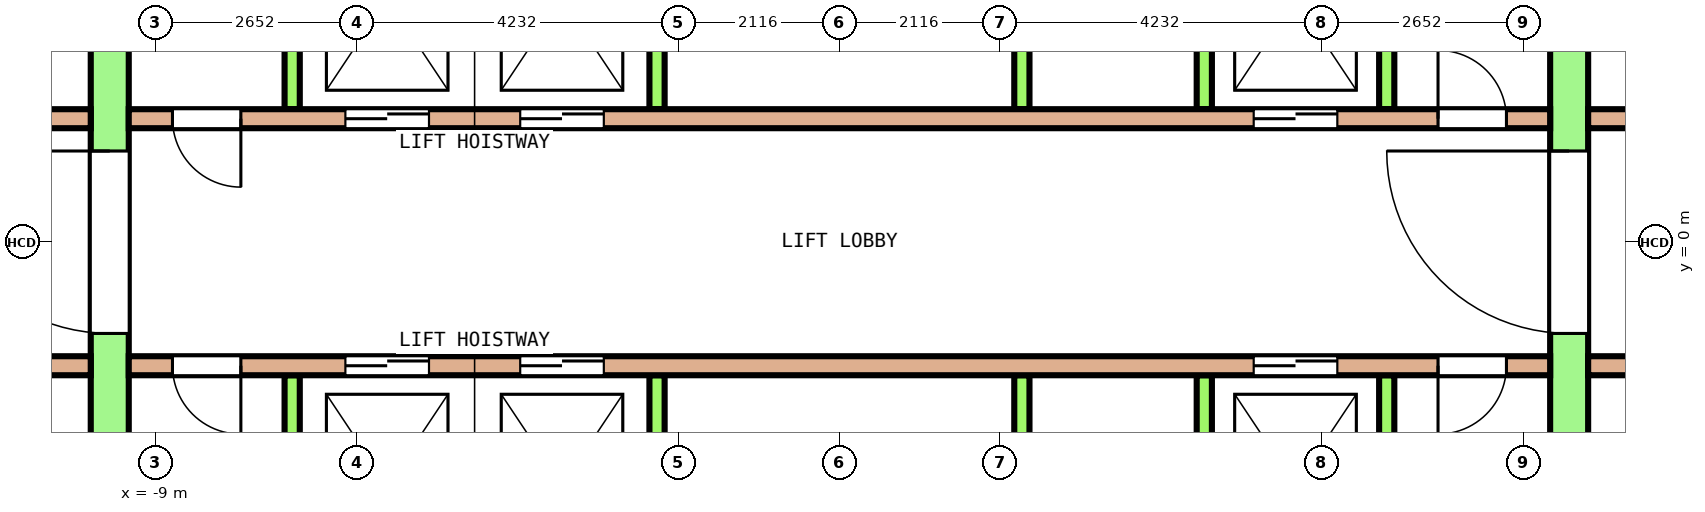
"""IFC4 building model, lengths in metres.
Left out: names, types, materials, properties, quantities, classifications, styles, units other than length and angle.
Written with IfcOpenShell. Run it as: python <this file> out.ifc"""

import sys

from ifc_helpers import new_model, si_unit, direction, frame, frame_2d, origin, place, context, subcontext, project, spatial, rectangle, extrude, element, fill, save


model = new_model("IFC4")
c1 = context("Model", 3, precision=1e-05, world=origin(), true_north=direction((0.0, 1.0)))
c2 = subcontext(c1, "Body", "Model", "MODEL_VIEW")
j1 = project(units=[si_unit("LENGTHUNIT", "METRE"), si_unit("PLANEANGLEUNIT", "RADIAN")], contexts=[c1])
p1 = place(None, origin())
s1 = spatial("IfcSite", under=j1, at=p1, CompositionType="ELEMENT")
p2 = place(p1, origin())
s2 = spatial("IfcBuilding", under=s1, at=p2, CompositionType="ELEMENT")
p3 = place(p2, frame((0.0, 0.0, 215.4)))
s3 = spatial("IfcBuildingStorey", under=s2, at=p3, CompositionType="ELEMENT", Elevation=215.4)
p4 = place(p3, frame((-9.6, -7.8, 0.0), z_axis=(0.0, 0.0, 1.0), x_axis=(0.0, 1.0, 0.0)))
e1 = element("IfcWall", 1, at=p4, inside=s3, PredefinedType="SHEAR", context=c2, shape_type="SweptSolid", body=[
    extrude(rectangle(XDim=15.6, YDim=0.5, at=frame_2d((7.8, 0.0))), origin(), (0.0, 0.0, 1.0), 3.7),
])
p5 = place(p4, frame((6.6, 0.0, 0.0)))
e2 = element("IfcOpeningElement", 2, at=p5, cuts=e1, PredefinedType="OPENING", context=c2, shape_type="SweptSolid", body=[
    extrude(rectangle(XDim=2.4, YDim=2.1, at=frame_2d((1.2, 1.05))), frame((0.0, 0.26, 0.0), z_axis=(0.0, -1.0, 0.0), x_axis=(1.0, 0.0, 0.0)), (0.0, 0.0, 1.0), 0.52),
])
p6 = place(p4, frame((13.5, 0.0, 0.0)))
e3 = element("IfcOpeningElement", 3, at=p6, cuts=e1, PredefinedType="OPENING", context=c2, shape_type="SweptSolid", body=[
    extrude(rectangle(XDim=1.2, YDim=2.1, at=frame_2d((0.6, 1.05))), frame((0.0, 0.26, 0.0), z_axis=(0.0, -1.0, 0.0), x_axis=(1.0, 0.0, 0.0)), (0.0, 0.0, 1.0), 0.52),
])
p7 = place(p4, frame((0.9, 0.0, 0.0)))
e4 = element("IfcOpeningElement", 4, at=p7, cuts=e1, PredefinedType="OPENING", context=c2, shape_type="SweptSolid", body=[
    extrude(rectangle(XDim=1.2, YDim=2.1, at=frame_2d((0.6, 1.05))), frame((0.0, 0.26, 0.0), z_axis=(0.0, -1.0, 0.0), x_axis=(1.0, 0.0, 0.0)), (0.0, 0.0, 1.0), 0.52),
])
p8 = place(p3, frame((9.6, -7.8, 0.0), z_axis=(0.0, 0.0, 1.0), x_axis=(0.0, 1.0, 0.0)))
e5 = element("IfcWall", 5, at=p8, inside=s3, PredefinedType="SHEAR", context=c2, shape_type="SweptSolid", body=[
    extrude(rectangle(XDim=15.6, YDim=0.5, at=frame_2d((7.8, 0.0))), origin(), (0.0, 0.0, 1.0), 3.7),
])
p9 = place(p8, frame((6.6, 0.0, 0.0)))
e6 = element("IfcOpeningElement", 6, at=p9, cuts=e5, PredefinedType="OPENING", context=c2, shape_type="SweptSolid", body=[
    extrude(rectangle(XDim=2.4, YDim=2.1, at=frame_2d((1.2, 1.05))), frame((0.0, 0.26, 0.0), z_axis=(0.0, -1.0, 0.0), x_axis=(1.0, 0.0, 0.0)), (0.0, 0.0, 1.0), 0.52),
])
p10 = place(p8, frame((13.5, 0.0, 0.0)))
e7 = element("IfcOpeningElement", 7, at=p10, cuts=e5, PredefinedType="OPENING", context=c2, shape_type="SweptSolid", body=[
    extrude(rectangle(XDim=1.2, YDim=2.1, at=frame_2d((0.6, 1.05))), frame((0.0, 0.26, 0.0), z_axis=(0.0, -1.0, 0.0), x_axis=(1.0, 0.0, 0.0)), (0.0, 0.0, 1.0), 0.52),
])
p11 = place(p8, frame((1.0, 0.0, 0.0)))
e8 = element("IfcOpeningElement", 8, at=p11, cuts=e5, PredefinedType="OPENING", context=c2, shape_type="SweptSolid", body=[
    extrude(rectangle(XDim=1.0, YDim=2.1, at=frame_2d((0.5, 1.05))), frame((0.0, 0.26, 0.0), z_axis=(0.0, -1.0, 0.0), x_axis=(1.0, 0.0, 0.0)), (0.0, 0.0, 1.0), 0.52),
])
p12 = place(p3, frame((-12.9, 1.625, 0.0), z_axis=(0.0, 0.0, 1.0), x_axis=(1.0, 0.0, 0.0)))
e9 = element("IfcWall", 9, at=p12, inside=s3, PredefinedType="SOLIDWALL", context=c2, shape_type="SweptSolid", body=[
    extrude(rectangle(XDim=3.05, YDim=0.25, at=frame_2d((1.525, 0.0))), origin(), (0.0, 0.0, 1.0), 3.7),
])
p13 = place(p12, frame((1.075, 0.0, 0.0)))
e10 = element("IfcOpeningElement", 10, at=p13, cuts=e9, PredefinedType="OPENING", context=c2, shape_type="SweptSolid", body=[
    extrude(rectangle(XDim=0.9, YDim=2.1, at=frame_2d((0.45, 1.05))), frame((0.0, 0.135, 0.0), z_axis=(0.0, -1.0, 0.0), x_axis=(1.0, 0.0, 0.0)), (0.0, 0.0, 1.0), 0.27),
])
p14 = place(p3, frame((-9.35, 1.625, 0.0), z_axis=(0.0, 0.0, 1.0), x_axis=(1.0, 0.0, 0.0)))
e11 = element("IfcWall", 11, at=p14, inside=s3, PredefinedType="SOLIDWALL", context=c2, shape_type="SweptSolid", body=[
    extrude(rectangle(XDim=18.7, YDim=0.25, at=frame_2d((9.35, 0.0))), origin(), (0.0, 0.0, 1.0), 3.7),
])
p15 = place(p14, frame((2.85, 0.0, 0.0)))
e12 = element("IfcOpeningElement", 12, at=p15, cuts=e11, PredefinedType="OPENING", context=c2, shape_type="SweptSolid", body=[
    extrude(rectangle(XDim=1.1, YDim=2.1, at=frame_2d((0.55, 1.05))), frame((0.0, 0.135, 0.0), z_axis=(0.0, -1.0, 0.0), x_axis=(1.0, 0.0, 0.0)), (0.0, 0.0, 1.0), 0.27),
])
p16 = place(p14, frame((5.15, 0.0, 0.0)))
e13 = element("IfcOpeningElement", 13, at=p16, cuts=e11, PredefinedType="OPENING", context=c2, shape_type="SweptSolid", body=[
    extrude(rectangle(XDim=1.1, YDim=2.1, at=frame_2d((0.55, 1.05))), frame((0.0, 0.135, 0.0), z_axis=(0.0, -1.0, 0.0), x_axis=(1.0, 0.0, 0.0)), (0.0, 0.0, 1.0), 0.27),
])
p17 = place(p14, frame((14.8, 0.0, 0.0)))
e14 = element("IfcOpeningElement", 14, at=p17, cuts=e11, PredefinedType="OPENING", context=c2, shape_type="SweptSolid", body=[
    extrude(rectangle(XDim=1.1, YDim=2.1, at=frame_2d((0.55, 1.05))), frame((0.0, 0.135, 0.0), z_axis=(0.0, -1.0, 0.0), x_axis=(1.0, 0.0, 0.0)), (0.0, 0.0, 1.0), 0.27),
])
p18 = place(p14, frame((0.575, 0.0, 0.0)))
e15 = element("IfcOpeningElement", 15, at=p18, cuts=e11, PredefinedType="OPENING", context=c2, shape_type="SweptSolid", body=[
    extrude(rectangle(XDim=0.9, YDim=2.1, at=frame_2d((0.45, 1.05))), frame((0.0, 0.135, 0.0), z_axis=(0.0, -1.0, 0.0), x_axis=(1.0, 0.0, 0.0)), (0.0, 0.0, 1.0), 0.27),
])
p19 = place(p14, frame((17.225, 0.0, 0.0)))
e16 = element("IfcOpeningElement", 16, at=p19, cuts=e11, PredefinedType="OPENING", context=c2, shape_type="SweptSolid", body=[
    extrude(rectangle(XDim=0.9, YDim=2.1, at=frame_2d((0.45, 1.05))), frame((0.0, 0.135, 0.0), z_axis=(0.0, -1.0, 0.0), x_axis=(1.0, 0.0, 0.0)), (0.0, 0.0, 1.0), 0.27),
])
p20 = place(p3, frame((9.85, 1.625, 0.0), z_axis=(0.0, 0.0, 1.0), x_axis=(1.0, 0.0, 0.0)))
e17 = element("IfcWall", 17, at=p20, inside=s3, PredefinedType="SOLIDWALL", context=c2, shape_type="SweptSolid", body=[
    extrude(rectangle(XDim=3.05, YDim=0.25, at=frame_2d((1.525, 0.0))), origin(), (0.0, 0.0, 1.0), 3.7),
])
p21 = place(p20, frame((1.075, 0.0, 0.0)))
e18 = element("IfcOpeningElement", 18, at=p21, cuts=e17, PredefinedType="OPENING", context=c2, shape_type="SweptSolid", body=[
    extrude(rectangle(XDim=0.9, YDim=2.1, at=frame_2d((0.45, 1.05))), frame((0.0, 0.135, 0.0), z_axis=(0.0, -1.0, 0.0), x_axis=(1.0, 0.0, 0.0)), (0.0, 0.0, 1.0), 0.27),
])
for number, where, z_axis, x_axis in (
    (19, (-7.2, 1.75, 0.0), (0.0, 0.0, 1.0), (0.0, 1.0, 0.0)),
    (20, (-2.4, 1.75, 0.0), (0.0, 0.0, 1.0), (0.0, 1.0, 0.0)),
    (21, (2.4, 1.75, 0.0), (0.0, 0.0, 1.0), (0.0, 1.0, 0.0)),
    (22, (4.8, 1.75, 0.0), (0.0, 0.0, 1.0), (0.0, 1.0, 0.0)),
    (23, (7.2, 1.75, 0.0), (0.0, 0.0, 1.0), (0.0, 1.0, 0.0)),
):
    element("IfcWall", number, at=place(p3, frame(where, z_axis=z_axis, x_axis=x_axis)), inside=s3, PredefinedType="SOLIDWALL", context=c2, shape_type="SweptSolid", body=[
        extrude(rectangle(XDim=2.9, YDim=0.2, at=frame_2d((1.45, 0.0))), origin(), (0.0, 0.0, 1.0), 3.7),
    ])
p22 = place(p3, frame((-12.9, -1.625, 0.0), z_axis=(0.0, 0.0, 1.0), x_axis=(1.0, 0.0, 0.0)))
e24 = element("IfcWall", 24, at=p22, inside=s3, PredefinedType="SOLIDWALL", context=c2, shape_type="SweptSolid", body=[
    extrude(rectangle(XDim=3.05, YDim=0.25, at=frame_2d((1.525, 0.0))), origin(), (0.0, 0.0, 1.0), 3.7),
])
p23 = place(p22, frame((1.075, 0.0, 0.0)))
e25 = element("IfcOpeningElement", 25, at=p23, cuts=e24, PredefinedType="OPENING", context=c2, shape_type="SweptSolid", body=[
    extrude(rectangle(XDim=0.9, YDim=2.1, at=frame_2d((0.45, 1.05))), frame((0.0, 0.135, 0.0), z_axis=(0.0, -1.0, 0.0), x_axis=(1.0, 0.0, 0.0)), (0.0, 0.0, 1.0), 0.27),
])
p24 = place(p3, frame((-9.35, -1.625, 0.0), z_axis=(0.0, 0.0, 1.0), x_axis=(1.0, 0.0, 0.0)))
e26 = element("IfcWall", 26, at=p24, inside=s3, PredefinedType="SOLIDWALL", context=c2, shape_type="SweptSolid", body=[
    extrude(rectangle(XDim=18.7, YDim=0.25, at=frame_2d((9.35, 0.0))), origin(), (0.0, 0.0, 1.0), 3.7),
])
p25 = place(p24, frame((2.85, 0.0, 0.0)))
e27 = element("IfcOpeningElement", 27, at=p25, cuts=e26, PredefinedType="OPENING", context=c2, shape_type="SweptSolid", body=[
    extrude(rectangle(XDim=1.1, YDim=2.1, at=frame_2d((0.55, 1.05))), frame((0.0, 0.135, 0.0), z_axis=(0.0, -1.0, 0.0), x_axis=(1.0, 0.0, 0.0)), (0.0, 0.0, 1.0), 0.27),
])
p26 = place(p24, frame((5.15, 0.0, 0.0)))
e28 = element("IfcOpeningElement", 28, at=p26, cuts=e26, PredefinedType="OPENING", context=c2, shape_type="SweptSolid", body=[
    extrude(rectangle(XDim=1.1, YDim=2.1, at=frame_2d((0.55, 1.05))), frame((0.0, 0.135, 0.0), z_axis=(0.0, -1.0, 0.0), x_axis=(1.0, 0.0, 0.0)), (0.0, 0.0, 1.0), 0.27),
])
p27 = place(p24, frame((14.8, 0.0, 0.0)))
e29 = element("IfcOpeningElement", 29, at=p27, cuts=e26, PredefinedType="OPENING", context=c2, shape_type="SweptSolid", body=[
    extrude(rectangle(XDim=1.1, YDim=2.1, at=frame_2d((0.55, 1.05))), frame((0.0, 0.135, 0.0), z_axis=(0.0, -1.0, 0.0), x_axis=(1.0, 0.0, 0.0)), (0.0, 0.0, 1.0), 0.27),
])
p28 = place(p24, frame((0.575, 0.0, 0.0)))
e30 = element("IfcOpeningElement", 30, at=p28, cuts=e26, PredefinedType="OPENING", context=c2, shape_type="SweptSolid", body=[
    extrude(rectangle(XDim=0.9, YDim=2.1, at=frame_2d((0.45, 1.05))), frame((0.0, 0.135, 0.0), z_axis=(0.0, -1.0, 0.0), x_axis=(1.0, 0.0, 0.0)), (0.0, 0.0, 1.0), 0.27),
])
p29 = place(p24, frame((17.225, 0.0, 0.0)))
e31 = element("IfcOpeningElement", 31, at=p29, cuts=e26, PredefinedType="OPENING", context=c2, shape_type="SweptSolid", body=[
    extrude(rectangle(XDim=0.9, YDim=2.1, at=frame_2d((0.45, 1.05))), frame((0.0, 0.135, 0.0), z_axis=(0.0, -1.0, 0.0), x_axis=(1.0, 0.0, 0.0)), (0.0, 0.0, 1.0), 0.27),
])
p30 = place(p3, frame((9.85, -1.625, 0.0), z_axis=(0.0, 0.0, 1.0), x_axis=(1.0, 0.0, 0.0)))
e32 = element("IfcWall", 32, at=p30, inside=s3, PredefinedType="SOLIDWALL", context=c2, shape_type="SweptSolid", body=[
    extrude(rectangle(XDim=3.05, YDim=0.25, at=frame_2d((1.525, 0.0))), origin(), (0.0, 0.0, 1.0), 3.7),
])
p31 = place(p30, frame((1.075, 0.0, 0.0)))
e33 = element("IfcOpeningElement", 33, at=p31, cuts=e32, PredefinedType="OPENING", context=c2, shape_type="SweptSolid", body=[
    extrude(rectangle(XDim=0.9, YDim=2.1, at=frame_2d((0.45, 1.05))), frame((0.0, 0.135, 0.0), z_axis=(0.0, -1.0, 0.0), x_axis=(1.0, 0.0, 0.0)), (0.0, 0.0, 1.0), 0.27),
])
for number, where, z_axis, x_axis in (
    (34, (-7.2, -4.65, 0.0), (0.0, 0.0, 1.0), (0.0, 1.0, 0.0)),
    (35, (-2.4, -4.65, 0.0), (0.0, 0.0, 1.0), (0.0, 1.0, 0.0)),
    (36, (2.4, -4.65, 0.0), (0.0, 0.0, 1.0), (0.0, 1.0, 0.0)),
    (37, (4.8, -4.65, 0.0), (0.0, 0.0, 1.0), (0.0, 1.0, 0.0)),
    (38, (7.2, -4.65, 0.0), (0.0, 0.0, 1.0), (0.0, 1.0, 0.0)),
):
    element("IfcWall", number, at=place(p3, frame(where, z_axis=z_axis, x_axis=x_axis)), inside=s3, PredefinedType="SOLIDWALL", context=c2, shape_type="SweptSolid", body=[
        extrude(rectangle(XDim=2.9, YDim=0.2, at=frame_2d((1.45, 0.0))), origin(), (0.0, 0.0, 1.0), 3.7),
    ])
p32 = place(p15, origin())
e39 = element("IfcDoor", 39, at=p32, inside=s3, OperationType="DOUBLE_DOOR_SLIDING", PredefinedType="DOOR", context=c2, shape_type="SweptSolid", body=[
    extrude(rectangle(XDim=1.1, YDim=2.1, at=frame_2d((0.55, 1.05))), frame((0.0, 0.075, 0.0), z_axis=(0.0, -1.0, 0.0), x_axis=(1.0, 0.0, 0.0)), (0.0, 0.0, 1.0), 0.15),
])
fill(e12, e39)
p33 = place(p16, origin())
e40 = element("IfcDoor", 40, at=p33, inside=s3, OperationType="DOUBLE_DOOR_SLIDING", PredefinedType="DOOR", context=c2, shape_type="SweptSolid", body=[
    extrude(rectangle(XDim=1.1, YDim=2.1, at=frame_2d((0.55, 1.05))), frame((0.0, 0.075, 0.0), z_axis=(0.0, -1.0, 0.0), x_axis=(1.0, 0.0, 0.0)), (0.0, 0.0, 1.0), 0.15),
])
fill(e13, e40)
p34 = place(p17, origin())
e41 = element("IfcDoor", 41, at=p34, inside=s3, OperationType="DOUBLE_DOOR_SLIDING", PredefinedType="DOOR", context=c2, shape_type="SweptSolid", body=[
    extrude(rectangle(XDim=1.1, YDim=2.1, at=frame_2d((0.55, 1.05))), frame((0.0, 0.075, 0.0), z_axis=(0.0, -1.0, 0.0), x_axis=(1.0, 0.0, 0.0)), (0.0, 0.0, 1.0), 0.15),
])
fill(e14, e41)
p35 = place(p25, origin())
e42 = element("IfcDoor", 42, at=p35, inside=s3, OperationType="DOUBLE_DOOR_SLIDING", PredefinedType="DOOR", context=c2, shape_type="SweptSolid", body=[
    extrude(rectangle(XDim=1.1, YDim=2.1, at=frame_2d((0.55, 1.05))), frame((0.0, 0.075, 0.0), z_axis=(0.0, -1.0, 0.0), x_axis=(1.0, 0.0, 0.0)), (0.0, 0.0, 1.0), 0.15),
])
fill(e27, e42)
p36 = place(p26, origin())
e43 = element("IfcDoor", 43, at=p36, inside=s3, OperationType="DOUBLE_DOOR_SLIDING", PredefinedType="DOOR", context=c2, shape_type="SweptSolid", body=[
    extrude(rectangle(XDim=1.1, YDim=2.1, at=frame_2d((0.55, 1.05))), frame((0.0, 0.075, 0.0), z_axis=(0.0, -1.0, 0.0), x_axis=(1.0, 0.0, 0.0)), (0.0, 0.0, 1.0), 0.15),
])
fill(e28, e43)
p37 = place(p27, origin())
e44 = element("IfcDoor", 44, at=p37, inside=s3, OperationType="DOUBLE_DOOR_SLIDING", PredefinedType="DOOR", context=c2, shape_type="SweptSolid", body=[
    extrude(rectangle(XDim=1.1, YDim=2.1, at=frame_2d((0.55, 1.05))), frame((0.0, 0.075, 0.0), z_axis=(0.0, -1.0, 0.0), x_axis=(1.0, 0.0, 0.0)), (0.0, 0.0, 1.0), 0.15),
])
fill(e29, e44)
p38 = place(p5, origin())
e45 = element("IfcDoor", 45, at=p38, inside=s3, OperationType="DOUBLE_DOOR_SINGLE_SWING", PredefinedType="DOOR", context=c2, shape_type="SweptSolid", body=[
    extrude(rectangle(XDim=2.4, YDim=2.1, at=frame_2d((1.2, 1.05))), frame((0.0, 0.2, 0.0), z_axis=(0.0, -1.0, 0.0), x_axis=(1.0, 0.0, 0.0)), (0.0, 0.0, 1.0), 0.4),
])
fill(e2, e45)
p39 = place(p9, origin())
e46 = element("IfcDoor", 46, at=p39, inside=s3, OperationType="DOUBLE_DOOR_SINGLE_SWING", PredefinedType="DOOR", context=c2, shape_type="SweptSolid", body=[
    extrude(rectangle(XDim=2.4, YDim=2.1, at=frame_2d((1.2, 1.05))), frame((0.0, 0.2, 0.0), z_axis=(0.0, -1.0, 0.0), x_axis=(1.0, 0.0, 0.0)), (0.0, 0.0, 1.0), 0.4),
])
fill(e6, e46)
p40 = place(p18, origin())
e47 = element("IfcDoor", 47, at=p40, inside=s3, OperationType="SINGLE_SWING_LEFT", PredefinedType="DOOR", context=c2, shape_type="SweptSolid", body=[
    extrude(rectangle(XDim=0.9, YDim=2.1, at=frame_2d((0.45, 1.05))), frame((0.0, 0.075, 0.0), z_axis=(0.0, -1.0, 0.0), x_axis=(1.0, 0.0, 0.0)), (0.0, 0.0, 1.0), 0.15),
])
fill(e15, e47)
p41 = place(p19, origin())
e48 = element("IfcDoor", 48, at=p41, inside=s3, OperationType="SINGLE_SWING_RIGHT", PredefinedType="DOOR", context=c2, shape_type="SweptSolid", body=[
    extrude(rectangle(XDim=0.9, YDim=2.1, at=frame_2d((0.45, 1.05))), frame((0.0, 0.075, 0.0), z_axis=(0.0, -1.0, 0.0), x_axis=(1.0, 0.0, 0.0)), (0.0, 0.0, 1.0), 0.15),
])
fill(e16, e48)
p42 = place(p28, origin())
e49 = element("IfcDoor", 49, at=p42, inside=s3, OperationType="SINGLE_SWING_LEFT", PredefinedType="DOOR", context=c2, shape_type="SweptSolid", body=[
    extrude(rectangle(XDim=0.9, YDim=2.1, at=frame_2d((0.45, 1.05))), frame((0.0, 0.075, 0.0), z_axis=(0.0, -1.0, 0.0), x_axis=(1.0, 0.0, 0.0)), (0.0, 0.0, 1.0), 0.15),
])
fill(e30, e49)
p43 = place(p29, origin())
e50 = element("IfcDoor", 50, at=p43, inside=s3, OperationType="SINGLE_SWING_RIGHT", PredefinedType="DOOR", context=c2, shape_type="SweptSolid", body=[
    extrude(rectangle(XDim=0.9, YDim=2.1, at=frame_2d((0.45, 1.05))), frame((0.0, 0.075, 0.0), z_axis=(0.0, -1.0, 0.0), x_axis=(1.0, 0.0, 0.0)), (0.0, 0.0, 1.0), 0.15),
])
fill(e31, e50)
save(model, sys.argv[1])
